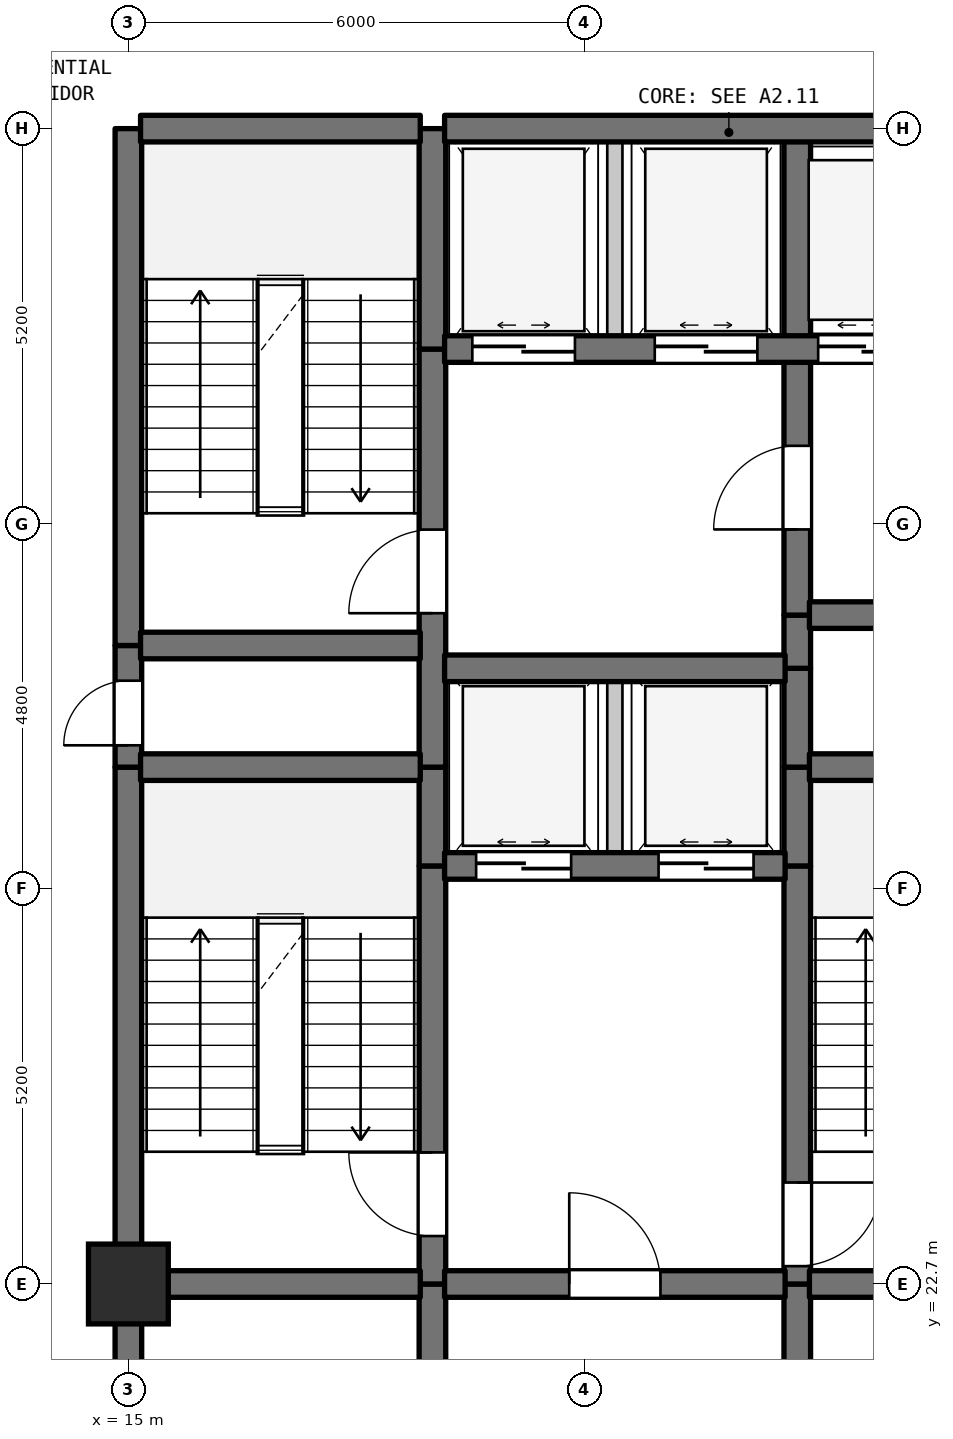
"""IFC4 building model, lengths in metres.
Left out: names, types, materials, properties, quantities, classifications, styles, units other than length and angle.
Written with IfcOpenShell. Run it as: python <this file> out.ifc"""

import sys

from ifc_helpers import new_model, si_unit, direction, frame, frame_2d, origin, origin_2d, place, context, subcontext, project, spatial, rectangle, extrude, element, fill, save


model = new_model("IFC4")
c1 = context("Model", 3, precision=1e-05, world=origin(), true_north=direction((0.0, 1.0)))
c2 = subcontext(c1, "Body", "Model", "MODEL_VIEW")
j1 = project(units=[si_unit("LENGTHUNIT", "METRE"), si_unit("PLANEANGLEUNIT", "RADIAN")], contexts=[c1])
p1 = place(None, origin())
s1 = spatial("IfcSite", under=j1, at=p1, CompositionType="ELEMENT")
p2 = place(p1, origin())
s2 = spatial("IfcBuilding", under=s1, at=p2, CompositionType="ELEMENT")
p3 = place(p2, frame((0.0, 0.0, 86.4)))
s3 = spatial("IfcBuildingStorey", under=s2, at=p3, CompositionType="ELEMENT", Elevation=86.4)
p4 = place(p3, frame((15.0, 22.7, 0.0), z_axis=(0.0, 0.0, 1.0), x_axis=(1.0, 0.0, 0.0)))
e1 = element("IfcColumn", 1, at=p4, inside=s3, PredefinedType="COLUMN", context=c2, shape_type="SweptSolid", body=[
    extrude(rectangle(XDim=1.05, YDim=1.05, at=origin_2d()), origin(), (0.0, 0.0, 1.0), 4.5),
])
p5 = place(p3, frame((15.0, 19.5, 0.0), z_axis=(0.0, 0.0, 1.0), x_axis=(0.0, 1.0, 0.0)))
e2 = element("IfcWall", 2, at=p5, inside=s3, PredefinedType="SHEAR", context=c2, shape_type="SweptSolid", body=[
    extrude(rectangle(XDim=3.2, YDim=0.35, at=frame_2d((1.6, 0.0))), origin(), (0.0, 0.0, 1.0), 4.185),
])
p6 = place(p3, frame((15.0, 22.7, 0.0), z_axis=(0.0, 0.0, 1.0), x_axis=(0.0, 1.0, 0.0)))
e3 = element("IfcWall", 3, at=p6, inside=s3, PredefinedType="SHEAR", context=c2, shape_type="SweptSolid", body=[
    extrude(rectangle(XDim=6.8, YDim=0.35, at=frame_2d((3.4, 0.0))), origin(), (0.0, 0.0, 1.0), 4.185),
])
p7 = place(p3, frame((15.0, 29.5, 0.0), z_axis=(0.0, 0.0, 1.0), x_axis=(0.0, 1.0, 0.0)))
e4 = element("IfcWall", 4, at=p7, inside=s3, PredefinedType="SHEAR", context=c2, shape_type="SweptSolid", body=[
    extrude(rectangle(XDim=1.6, YDim=0.35, at=frame_2d((0.8, 0.0))), origin(), (0.0, 0.0, 1.0), 4.185),
])
p8 = place(p7, frame((0.287, 0.0, 0.0)))
e5 = element("IfcOpeningElement", 5, at=p8, cuts=e4, PredefinedType="OPENING", context=c2, shape_type="SweptSolid", body=[
    extrude(rectangle(XDim=0.85, YDim=2.1, at=frame_2d((0.425, 1.05))), frame((0.0, 0.185, 0.0), z_axis=(0.0, -1.0, 0.0), x_axis=(1.0, 0.0, 0.0)), (0.0, 0.0, 1.0), 0.37),
])
p9 = place(p3, frame((15.0, 31.1, 0.0), z_axis=(0.0, 0.0, 1.0), x_axis=(0.0, 1.0, 0.0)))
e6 = element("IfcWall", 6, at=p9, inside=s3, PredefinedType="SHEAR", context=c2, shape_type="SweptSolid", body=[
    extrude(rectangle(XDim=6.8, YDim=0.35, at=frame_2d((3.4, 0.0))), origin(), (0.0, 0.0, 1.0), 4.185),
])
p10 = place(p3, frame((19.0, 19.5, 0.0), z_axis=(0.0, 0.0, 1.0), x_axis=(0.0, 1.0, 0.0)))
e7 = element("IfcWall", 7, at=p10, inside=s3, PredefinedType="SHEAR", context=c2, shape_type="SweptSolid", body=[
    extrude(rectangle(XDim=3.2, YDim=0.35, at=frame_2d((1.6, 0.0))), origin(), (0.0, 0.0, 1.0), 4.185),
])
p11 = place(p3, frame((19.0, 22.7, 0.0), z_axis=(0.0, 0.0, 1.0), x_axis=(0.0, 1.0, 0.0)))
e8 = element("IfcWall", 8, at=p11, inside=s3, PredefinedType="SHEAR", context=c2, shape_type="SweptSolid", body=[
    extrude(rectangle(XDim=5.5, YDim=0.35, at=frame_2d((2.75, 0.0))), origin(), (0.0, 0.0, 1.0), 4.185),
])
p12 = place(p11, frame((0.631, 0.0, 0.0)))
e9 = element("IfcOpeningElement", 9, at=p12, cuts=e8, PredefinedType="OPENING", context=c2, shape_type="SweptSolid", body=[
    extrude(rectangle(XDim=1.1, YDim=2.15, at=frame_2d((0.55, 1.075))), frame((0.0, 0.185, 0.0), z_axis=(0.0, -1.0, 0.0), x_axis=(1.0, 0.0, 0.0)), (0.0, 0.0, 1.0), 0.37),
])
p13 = place(p3, frame((19.0, 28.2, 0.0), z_axis=(0.0, 0.0, 1.0), x_axis=(0.0, 1.0, 0.0)))
e10 = element("IfcWall", 10, at=p13, inside=s3, PredefinedType="SHEAR", context=c2, shape_type="SweptSolid", body=[
    extrude(rectangle(XDim=1.3, YDim=0.35, at=frame_2d((0.65, 0.0))), origin(), (0.0, 0.0, 1.0), 4.185),
])
p14 = place(p3, frame((19.0, 29.5, 0.0), z_axis=(0.0, 0.0, 1.0), x_axis=(0.0, 1.0, 0.0)))
e11 = element("IfcWall", 11, at=p14, inside=s3, PredefinedType="SHEAR", context=c2, shape_type="SweptSolid", body=[
    extrude(rectangle(XDim=5.5, YDim=0.35, at=frame_2d((2.75, 0.0))), origin(), (0.0, 0.0, 1.0), 4.185),
])
p15 = place(p14, frame((2.025, 0.0, 0.0)))
e12 = element("IfcOpeningElement", 12, at=p15, cuts=e11, PredefinedType="OPENING", context=c2, shape_type="SweptSolid", body=[
    extrude(rectangle(XDim=1.1, YDim=2.15, at=frame_2d((0.55, 1.075))), frame((0.0, 0.185, 0.0), z_axis=(0.0, -1.0, 0.0), x_axis=(1.0, 0.0, 0.0)), (0.0, 0.0, 1.0), 0.37),
])
p16 = place(p3, frame((19.0, 35.0, 0.0), z_axis=(0.0, 0.0, 1.0), x_axis=(0.0, 1.0, 0.0)))
e13 = element("IfcWall", 13, at=p16, inside=s3, PredefinedType="SHEAR", context=c2, shape_type="SweptSolid", body=[
    extrude(rectangle(XDim=2.9, YDim=0.35, at=frame_2d((1.45, 0.0))), origin(), (0.0, 0.0, 1.0), 4.185),
])
p17 = place(p3, frame((21.4, 28.2, 0.0), z_axis=(0.0, 0.0, 1.0), x_axis=(0.0, 1.0, 0.0)))
e14 = element("IfcWall", 14, at=p17, inside=s3, PredefinedType="STANDARD", context=c2, shape_type="SweptSolid", body=[
    extrude(rectangle(XDim=2.6, YDim=0.2, at=frame_2d((1.3, 0.0))), origin(), (0.0, 0.0, 1.0), 4.185),
])
p18 = place(p3, frame((21.4, 35.0, 0.0), z_axis=(0.0, 0.0, 1.0), x_axis=(0.0, 1.0, 0.0)))
e15 = element("IfcWall", 15, at=p18, inside=s3, PredefinedType="STANDARD", context=c2, shape_type="SweptSolid", body=[
    extrude(rectangle(XDim=2.9, YDim=0.2, at=frame_2d((1.45, 0.0))), origin(), (0.0, 0.0, 1.0), 4.185),
])
p19 = place(p3, frame((23.8, 19.5, 0.0), z_axis=(0.0, 0.0, 1.0), x_axis=(0.0, 1.0, 0.0)))
e16 = element("IfcWall", 16, at=p19, inside=s3, PredefinedType="SHEAR", context=c2, shape_type="SweptSolid", body=[
    extrude(rectangle(XDim=3.2, YDim=0.35, at=frame_2d((1.6, 0.0))), origin(), (0.0, 0.0, 1.0), 4.185),
])
p20 = place(p3, frame((23.8, 22.7, 0.0), z_axis=(0.0, 0.0, 1.0), x_axis=(0.0, 1.0, 0.0)))
e17 = element("IfcWall", 17, at=p20, inside=s3, PredefinedType="SHEAR", context=c2, shape_type="SweptSolid", body=[
    extrude(rectangle(XDim=5.5, YDim=0.35, at=frame_2d((2.75, 0.0))), origin(), (0.0, 0.0, 1.0), 4.185),
])
p21 = place(p20, frame((0.235, 0.0, 0.0)))
e18 = element("IfcOpeningElement", 18, at=p21, cuts=e17, PredefinedType="OPENING", context=c2, shape_type="SweptSolid", body=[
    extrude(rectangle(XDim=1.1, YDim=2.15, at=frame_2d((0.55, 1.075))), frame((0.0, 0.185, 0.0), z_axis=(0.0, -1.0, 0.0), x_axis=(1.0, 0.0, 0.0)), (0.0, 0.0, 1.0), 0.37),
])
for number, where, z_axis, x_axis in (
    (19, (23.8, 28.2, 0.0), (0.0, 0.0, 1.0), (0.0, 1.0, 0.0)),
    (20, (23.8, 29.5, 0.0), (0.0, 0.0, 1.0), (0.0, 1.0, 0.0)),
):
    element("IfcWall", number, at=place(p3, frame(where, z_axis=z_axis, x_axis=x_axis)), inside=s3, PredefinedType="SHEAR", context=c2, shape_type="SweptSolid", body=[
        extrude(rectangle(XDim=1.3, YDim=0.35, at=frame_2d((0.65, 0.0))), origin(), (0.0, 0.0, 1.0), 4.185),
    ])
p22 = place(p3, frame((23.8, 30.8, 0.0), z_axis=(0.0, 0.0, 1.0), x_axis=(0.0, 1.0, 0.0)))
e21 = element("IfcWall", 21, at=p22, inside=s3, PredefinedType="SHEAR", context=c2, shape_type="SweptSolid", body=[
    extrude(rectangle(XDim=0.7, YDim=0.35, at=frame_2d((0.35, 0.0))), origin(), (0.0, 0.0, 1.0), 4.185),
])
p23 = place(p3, frame((23.8, 31.5, 0.0), z_axis=(0.0, 0.0, 1.0), x_axis=(0.0, 1.0, 0.0)))
e22 = element("IfcWall", 22, at=p23, inside=s3, PredefinedType="SHEAR", context=c2, shape_type="SweptSolid", body=[
    extrude(rectangle(XDim=3.5, YDim=0.35, at=frame_2d((1.75, 0.0))), origin(), (0.0, 0.0, 1.0), 4.185),
])
p24 = place(p23, frame((1.127, 0.0, 0.0)))
e23 = element("IfcOpeningElement", 23, at=p24, cuts=e22, PredefinedType="OPENING", context=c2, shape_type="SweptSolid", body=[
    extrude(rectangle(XDim=1.1, YDim=2.15, at=frame_2d((0.55, 1.075))), frame((0.0, 0.185, 0.0), z_axis=(0.0, -1.0, 0.0), x_axis=(1.0, 0.0, 0.0)), (0.0, 0.0, 1.0), 0.37),
])
p25 = place(p3, frame((23.8, 35.0, 0.0), z_axis=(0.0, 0.0, 1.0), x_axis=(0.0, 1.0, 0.0)))
e24 = element("IfcWall", 24, at=p25, inside=s3, PredefinedType="SHEAR", context=c2, shape_type="SweptSolid", body=[
    extrude(rectangle(XDim=2.9, YDim=0.35, at=frame_2d((1.45, 0.0))), origin(), (0.0, 0.0, 1.0), 4.185),
])
p26 = place(p3, frame((15.16, 22.7, 0.0), z_axis=(0.0, 0.0, 1.0), x_axis=(1.0, 0.0, 0.0)))
e25 = element("IfcWall", 25, at=p26, inside=s3, PredefinedType="SHEAR", context=c2, shape_type="SweptSolid", body=[
    extrude(rectangle(XDim=3.68, YDim=0.35, at=frame_2d((1.84, 0.0))), origin(), (0.0, 0.0, 1.0), 4.185),
])
p27 = place(p3, frame((19.16, 22.7, 0.0), z_axis=(0.0, 0.0, 1.0), x_axis=(1.0, 0.0, 0.0)))
e26 = element("IfcWall", 26, at=p27, inside=s3, PredefinedType="SHEAR", context=c2, shape_type="SweptSolid", body=[
    extrude(rectangle(XDim=4.48, YDim=0.35, at=frame_2d((2.24, 0.0))), origin(), (0.0, 0.0, 1.0), 4.185),
])
p28 = place(p27, frame((1.64, 0.0, 0.0)))
e27 = element("IfcOpeningElement", 27, at=p28, cuts=e26, PredefinedType="OPENING", context=c2, shape_type="SweptSolid", body=[
    extrude(rectangle(XDim=1.2, YDim=2.2, at=frame_2d((0.6, 1.1))), frame((0.0, 0.185, 0.0), z_axis=(0.0, -1.0, 0.0), x_axis=(1.0, 0.0, 0.0)), (0.0, 0.0, 1.0), 0.37),
])
p29 = place(p3, frame((23.96, 22.7, 0.0), z_axis=(0.0, 0.0, 1.0), x_axis=(1.0, 0.0, 0.0)))
e28 = element("IfcWall", 28, at=p29, inside=s3, PredefinedType="SHEAR", context=c2, shape_type="SweptSolid", body=[
    extrude(rectangle(XDim=3.18, YDim=0.35, at=frame_2d((1.59, 0.0))), origin(), (0.0, 0.0, 1.0), 4.185),
])
p30 = place(p3, frame((19.16, 28.2, 0.0), z_axis=(0.0, 0.0, 1.0), x_axis=(1.0, 0.0, 0.0)))
e29 = element("IfcWall", 29, at=p30, inside=s3, PredefinedType="SHEAR", context=c2, shape_type="SweptSolid", body=[
    extrude(rectangle(XDim=4.48, YDim=0.35, at=frame_2d((2.24, 0.0))), origin(), (0.0, 0.0, 1.0), 4.185),
])
p31 = place(p30, frame((0.415, 0.0, 0.0)))
e30 = element("IfcOpeningElement", 30, at=p31, cuts=e29, PredefinedType="OPENING", context=c2, shape_type="SweptSolid", body=[
    extrude(rectangle(XDim=1.25, YDim=2.2, at=frame_2d((0.625, 1.1))), frame((0.0, 0.185, 0.0), z_axis=(0.0, -1.0, 0.0), x_axis=(1.0, 0.0, 0.0)), (0.0, 0.0, 1.0), 0.37),
])
p32 = place(p30, frame((2.815, 0.0, 0.0)))
e31 = element("IfcOpeningElement", 31, at=p32, cuts=e29, PredefinedType="OPENING", context=c2, shape_type="SweptSolid", body=[
    extrude(rectangle(XDim=1.25, YDim=2.2, at=frame_2d((0.625, 1.1))), frame((0.0, 0.185, 0.0), z_axis=(0.0, -1.0, 0.0), x_axis=(1.0, 0.0, 0.0)), (0.0, 0.0, 1.0), 0.37),
])
p33 = place(p3, frame((15.16, 29.5, 0.0), z_axis=(0.0, 0.0, 1.0), x_axis=(1.0, 0.0, 0.0)))
e32 = element("IfcWall", 32, at=p33, inside=s3, PredefinedType="SHEAR", context=c2, shape_type="SweptSolid", body=[
    extrude(rectangle(XDim=3.68, YDim=0.35, at=frame_2d((1.84, 0.0))), origin(), (0.0, 0.0, 1.0), 4.185),
])
p34 = place(p3, frame((23.96, 29.5, 0.0), z_axis=(0.0, 0.0, 1.0), x_axis=(1.0, 0.0, 0.0)))
e33 = element("IfcWall", 33, at=p34, inside=s3, PredefinedType="SHEAR", context=c2, shape_type="SweptSolid", body=[
    extrude(rectangle(XDim=3.18, YDim=0.35, at=frame_2d((1.59, 0.0))), origin(), (0.0, 0.0, 1.0), 4.185),
])
p35 = place(p3, frame((19.16, 30.8, 0.0), z_axis=(0.0, 0.0, 1.0), x_axis=(1.0, 0.0, 0.0)))
e34 = element("IfcWall", 34, at=p35, inside=s3, PredefinedType="SHEAR", context=c2, shape_type="SweptSolid", body=[
    extrude(rectangle(XDim=4.48, YDim=0.35, at=frame_2d((2.24, 0.0))), origin(), (0.0, 0.0, 1.0), 4.185),
])
p36 = place(p3, frame((15.16, 31.1, 0.0), z_axis=(0.0, 0.0, 1.0), x_axis=(1.0, 0.0, 0.0)))
e35 = element("IfcWall", 35, at=p36, inside=s3, PredefinedType="SHEAR", context=c2, shape_type="SweptSolid", body=[
    extrude(rectangle(XDim=3.68, YDim=0.35, at=frame_2d((1.84, 0.0))), origin(), (0.0, 0.0, 1.0), 4.185),
])
p37 = place(p3, frame((23.96, 31.5, 0.0), z_axis=(0.0, 0.0, 1.0), x_axis=(1.0, 0.0, 0.0)))
e36 = element("IfcWall", 36, at=p37, inside=s3, PredefinedType="SHEAR", context=c2, shape_type="SweptSolid", body=[
    extrude(rectangle(XDim=3.18, YDim=0.35, at=frame_2d((1.59, 0.0))), origin(), (0.0, 0.0, 1.0), 4.185),
])
p38 = place(p37, frame((1.094, 0.0, 0.0)))
e37 = element("IfcOpeningElement", 37, at=p38, cuts=e36, PredefinedType="OPENING", context=c2, shape_type="SweptSolid", body=[
    extrude(rectangle(XDim=0.85, YDim=2.1, at=frame_2d((0.425, 1.05))), frame((0.0, 0.185, 0.0), z_axis=(0.0, -1.0, 0.0), x_axis=(1.0, 0.0, 0.0)), (0.0, 0.0, 1.0), 0.37),
])
p39 = place(p3, frame((19.16, 35.0, 0.0), z_axis=(0.0, 0.0, 1.0), x_axis=(1.0, 0.0, 0.0)))
e38 = element("IfcWall", 38, at=p39, inside=s3, PredefinedType="SHEAR", context=c2, shape_type="SweptSolid", body=[
    extrude(rectangle(XDim=11.48, YDim=0.35, at=frame_2d((5.74, 0.0))), origin(), (0.0, 0.0, 1.0), 4.185),
])
p40 = place(p39, frame((0.365, 0.0, 0.0)))
e39 = element("IfcOpeningElement", 39, at=p40, cuts=e38, PredefinedType="OPENING", context=c2, shape_type="SweptSolid", body=[
    extrude(rectangle(XDim=1.35, YDim=2.2, at=frame_2d((0.675, 1.1))), frame((0.0, 0.185, 0.0), z_axis=(0.0, -1.0, 0.0), x_axis=(1.0, 0.0, 0.0)), (0.0, 0.0, 1.0), 0.37),
])
p41 = place(p39, frame((2.765, 0.0, 0.0)))
e40 = element("IfcOpeningElement", 40, at=p41, cuts=e38, PredefinedType="OPENING", context=c2, shape_type="SweptSolid", body=[
    extrude(rectangle(XDim=1.35, YDim=2.2, at=frame_2d((0.675, 1.1))), frame((0.0, 0.185, 0.0), z_axis=(0.0, -1.0, 0.0), x_axis=(1.0, 0.0, 0.0)), (0.0, 0.0, 1.0), 0.37),
])
p42 = place(p39, frame((4.915, 0.0, 0.0)))
e41 = element("IfcOpeningElement", 41, at=p42, cuts=e38, PredefinedType="OPENING", context=c2, shape_type="SweptSolid", body=[
    extrude(rectangle(XDim=1.2, YDim=2.2, at=frame_2d((0.6, 1.1))), frame((0.0, 0.185, 0.0), z_axis=(0.0, -1.0, 0.0), x_axis=(1.0, 0.0, 0.0)), (0.0, 0.0, 1.0), 0.37),
])
p43 = place(p39, frame((6.665, 0.0, 0.0)))
e42 = element("IfcOpeningElement", 42, at=p43, cuts=e38, PredefinedType="OPENING", context=c2, shape_type="SweptSolid", body=[
    extrude(rectangle(XDim=1.2, YDim=2.2, at=frame_2d((0.6, 1.1))), frame((0.0, 0.185, 0.0), z_axis=(0.0, -1.0, 0.0), x_axis=(1.0, 0.0, 0.0)), (0.0, 0.0, 1.0), 0.37),
])
p44 = place(p39, frame((8.415, 0.0, 0.0)))
e43 = element("IfcOpeningElement", 43, at=p44, cuts=e38, PredefinedType="OPENING", context=c2, shape_type="SweptSolid", body=[
    extrude(rectangle(XDim=1.2, YDim=2.2, at=frame_2d((0.6, 1.1))), frame((0.0, 0.185, 0.0), z_axis=(0.0, -1.0, 0.0), x_axis=(1.0, 0.0, 0.0)), (0.0, 0.0, 1.0), 0.37),
])
p45 = place(p39, frame((10.16, 0.0, 0.0)))
e44 = element("IfcOpeningElement", 44, at=p45, cuts=e38, PredefinedType="OPENING", context=c2, shape_type="SweptSolid", body=[
    extrude(rectangle(XDim=1.2, YDim=2.2, at=frame_2d((0.6, 1.1))), frame((0.0, 0.185, 0.0), z_axis=(0.0, -1.0, 0.0), x_axis=(1.0, 0.0, 0.0)), (0.0, 0.0, 1.0), 0.37),
])
p46 = place(p3, frame((15.16, 37.9, 0.0), z_axis=(0.0, 0.0, 1.0), x_axis=(1.0, 0.0, 0.0)))
e45 = element("IfcWall", 45, at=p46, inside=s3, PredefinedType="SHEAR", context=c2, shape_type="SweptSolid", body=[
    extrude(rectangle(XDim=3.68, YDim=0.35, at=frame_2d((1.84, 0.0))), origin(), (0.0, 0.0, 1.0), 4.185),
])
p47 = place(p3, frame((19.16, 37.9, 0.0), z_axis=(0.0, 0.0, 1.0), x_axis=(1.0, 0.0, 0.0)))
e46 = element("IfcWall", 46, at=p47, inside=s3, PredefinedType="SHEAR", context=c2, shape_type="SweptSolid", body=[
    extrude(rectangle(XDim=11.48, YDim=0.35, at=frame_2d((5.74, 0.0))), origin(), (0.0, 0.0, 1.0), 4.185),
])
p48 = place(p8, origin())
e47 = element("IfcDoor", 47, at=p48, inside=s3, OperationType="SINGLE_SWING_LEFT", PredefinedType="DOOR", context=c2, shape_type="SweptSolid", body=[
    extrude(rectangle(XDim=0.85, YDim=2.1, at=frame_2d((0.425, 1.05))), frame((0.0, 0.025, 0.0), z_axis=(0.0, -1.0, 0.0), x_axis=(1.0, 0.0, 0.0)), (0.0, 0.0, 1.0), 0.05),
])
fill(e5, e47)
p49 = place(p12, origin())
e48 = element("IfcDoor", 48, at=p49, inside=s3, OperationType="SINGLE_SWING_RIGHT", PredefinedType="DOOR", context=c2, shape_type="SweptSolid", body=[
    extrude(rectangle(XDim=1.1, YDim=2.15, at=frame_2d((0.55, 1.075))), frame((0.0, 0.025, 0.0), z_axis=(0.0, -1.0, 0.0), x_axis=(1.0, 0.0, 0.0)), (0.0, 0.0, 1.0), 0.05),
])
fill(e9, e48)
p50 = place(p15, origin())
e49 = element("IfcDoor", 49, at=p50, inside=s3, OperationType="SINGLE_SWING_LEFT", PredefinedType="DOOR", context=c2, shape_type="SweptSolid", body=[
    extrude(rectangle(XDim=1.1, YDim=2.15, at=frame_2d((0.55, 1.075))), frame((0.0, 0.025, 0.0), z_axis=(0.0, -1.0, 0.0), x_axis=(1.0, 0.0, 0.0)), (0.0, 0.0, 1.0), 0.05),
])
fill(e12, e49)
p51 = place(p21, frame((1.1, 0.0, 0.0), z_axis=(0.0, 0.0, 1.0), x_axis=(-1.0, 0.0, 0.0)))
e50 = element("IfcDoor", 50, at=p51, inside=s3, OperationType="SINGLE_SWING_RIGHT", PredefinedType="DOOR", context=c2, shape_type="SweptSolid", body=[
    extrude(rectangle(XDim=1.1, YDim=2.15, at=frame_2d((0.55, 1.075))), frame((0.0, 0.025, 0.0), z_axis=(0.0, -1.0, 0.0), x_axis=(1.0, 0.0, 0.0)), (0.0, 0.0, 1.0), 0.05),
])
fill(e18, e50)
p52 = place(p24, origin())
e51 = element("IfcDoor", 51, at=p52, inside=s3, OperationType="SINGLE_SWING_LEFT", PredefinedType="DOOR", context=c2, shape_type="SweptSolid", body=[
    extrude(rectangle(XDim=1.1, YDim=2.15, at=frame_2d((0.55, 1.075))), frame((0.0, 0.025, 0.0), z_axis=(0.0, -1.0, 0.0), x_axis=(1.0, 0.0, 0.0)), (0.0, 0.0, 1.0), 0.05),
])
fill(e23, e51)
p53 = place(p28, origin())
e52 = element("IfcDoor", 52, at=p53, inside=s3, OperationType="SINGLE_SWING_LEFT", PredefinedType="DOOR", context=c2, shape_type="SweptSolid", body=[
    extrude(rectangle(XDim=1.2, YDim=2.2, at=frame_2d((0.6, 1.1))), frame((0.0, 0.025, 0.0), z_axis=(0.0, -1.0, 0.0), x_axis=(1.0, 0.0, 0.0)), (0.0, 0.0, 1.0), 0.05),
])
fill(e27, e52)
p54 = place(p31, origin())
e53 = element("IfcDoor", 53, at=p54, inside=s3, OperationType="DOUBLE_DOOR_SLIDING", PredefinedType="DOOR", context=c2, shape_type="SweptSolid", body=[
    extrude(rectangle(XDim=1.25, YDim=2.2, at=frame_2d((0.625, 1.1))), frame((0.0, 0.025, 0.0), z_axis=(0.0, -1.0, 0.0), x_axis=(1.0, 0.0, 0.0)), (0.0, 0.0, 1.0), 0.05),
])
fill(e30, e53)
p55 = place(p32, origin())
e54 = element("IfcDoor", 54, at=p55, inside=s3, OperationType="DOUBLE_DOOR_SLIDING", PredefinedType="DOOR", context=c2, shape_type="SweptSolid", body=[
    extrude(rectangle(XDim=1.25, YDim=2.2, at=frame_2d((0.625, 1.1))), frame((0.0, 0.025, 0.0), z_axis=(0.0, -1.0, 0.0), x_axis=(1.0, 0.0, 0.0)), (0.0, 0.0, 1.0), 0.05),
])
fill(e31, e54)
p56 = place(p40, origin())
e55 = element("IfcDoor", 55, at=p56, inside=s3, OperationType="DOUBLE_DOOR_SLIDING", PredefinedType="DOOR", context=c2, shape_type="SweptSolid", body=[
    extrude(rectangle(XDim=1.35, YDim=2.2, at=frame_2d((0.675, 1.1))), frame((0.0, 0.025, 0.0), z_axis=(0.0, -1.0, 0.0), x_axis=(1.0, 0.0, 0.0)), (0.0, 0.0, 1.0), 0.05),
])
fill(e39, e55)
p57 = place(p41, origin())
e56 = element("IfcDoor", 56, at=p57, inside=s3, OperationType="DOUBLE_DOOR_SLIDING", PredefinedType="DOOR", context=c2, shape_type="SweptSolid", body=[
    extrude(rectangle(XDim=1.35, YDim=2.2, at=frame_2d((0.675, 1.1))), frame((0.0, 0.025, 0.0), z_axis=(0.0, -1.0, 0.0), x_axis=(1.0, 0.0, 0.0)), (0.0, 0.0, 1.0), 0.05),
])
fill(e40, e56)
p58 = place(p42, origin())
e57 = element("IfcDoor", 57, at=p58, inside=s3, OperationType="DOUBLE_DOOR_SLIDING", PredefinedType="DOOR", context=c2, shape_type="SweptSolid", body=[
    extrude(rectangle(XDim=1.2, YDim=2.2, at=frame_2d((0.6, 1.1))), frame((0.0, 0.025, 0.0), z_axis=(0.0, -1.0, 0.0), x_axis=(1.0, 0.0, 0.0)), (0.0, 0.0, 1.0), 0.05),
])
fill(e41, e57)
save(model, sys.argv[1])
